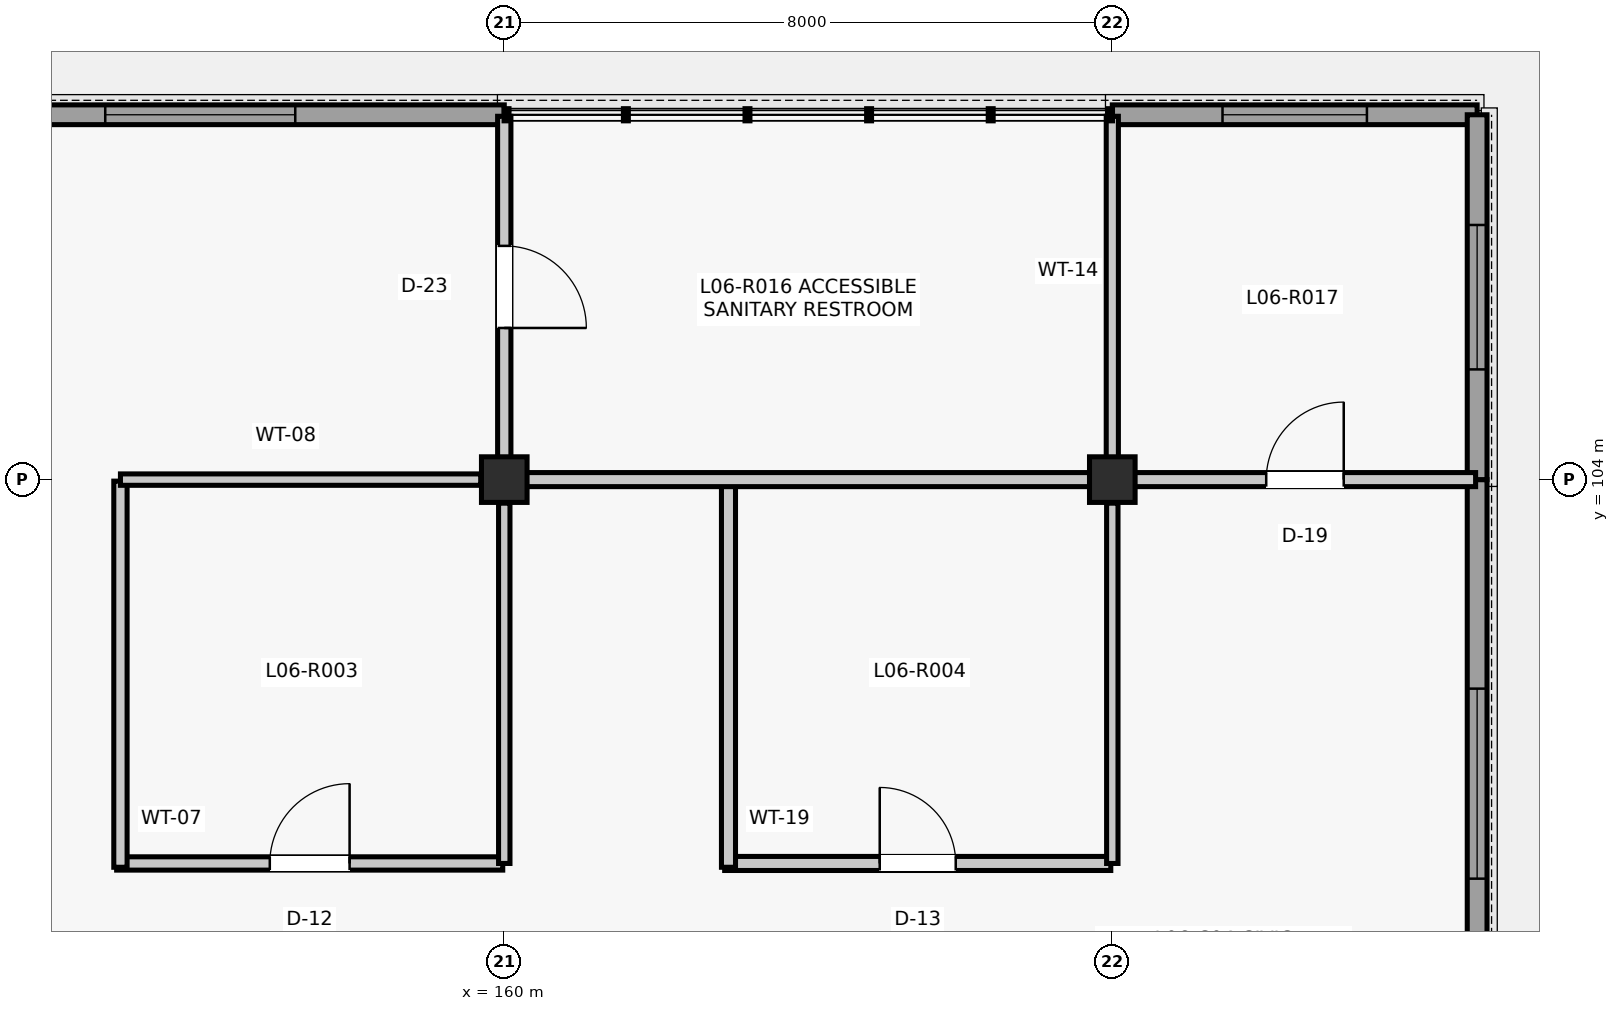
"""IFC4 building model, lengths in metres.
Left out: names, types, materials, properties, quantities, classifications, styles, units other than length and angle.
Written with IfcOpenShell. Run it as: python <this file> out.ifc"""

import sys

from ifc_helpers import new_model, si_unit, direction, frame, frame_2d, origin, origin_2d, place, context, subcontext, project, spatial, rectangle, extrude, element, fill, save


model = new_model("IFC4")
c1 = context("Model", 3, precision=1e-05, world=origin(), true_north=direction((0.0, 1.0)))
c2 = subcontext(c1, "Body", "Model", "MODEL_VIEW")
j1 = project(units=[si_unit("LENGTHUNIT", "METRE"), si_unit("PLANEANGLEUNIT", "RADIAN")], contexts=[c1])
p1 = place(None, origin())
s1 = spatial("IfcSite", under=j1, at=p1, CompositionType="ELEMENT")
p2 = place(p1, origin())
s2 = spatial("IfcBuilding", under=s1, at=p2, CompositionType="ELEMENT")
p3 = place(p2, frame((0.0, 0.0, 25.74)))
s3 = spatial("IfcBuildingStorey", under=s2, at=p3, CompositionType="ELEMENT", Elevation=25.74)
for number, where, z_axis, x_axis in (
    (1, (160.0, 104.0, 0.0), (0.0, 0.0, 1.0), (1.0, 0.0, 0.0)),
    (2, (168.0, 104.0, 0.0), (0.0, 0.0, 1.0), (1.0, 0.0, 0.0)),
):
    element("IfcColumn", number, at=place(p3, frame(where, z_axis=z_axis, x_axis=x_axis)), inside=s3, PredefinedType="COLUMN", context=c2, shape_type="SweptSolid", body=[
        extrude(rectangle(XDim=0.6, YDim=0.6, at=origin_2d()), origin(), (0.0, 0.0, 1.0), 4.29),
    ])
p4 = place(p3, frame((152.0, 108.8, 0.0), z_axis=(0.0, 0.0, 1.0), x_axis=(1.0, 0.0, 0.0)))
e3 = element("IfcWall", 3, at=p4, inside=s3, PredefinedType="SOLIDWALL", context=c2, shape_type="SweptSolid", body=[
    extrude(rectangle(XDim=8.0, YDim=0.26, at=frame_2d((4.0, 0.0))), origin(), (0.0, 0.0, 1.0), 4.09),
])
p5 = place(p4, frame((2.75, 0.0, 0.85)))
e4 = element("IfcOpeningElement", 4, at=p5, cuts=e3, PredefinedType="OPENING", context=c2, shape_type="SweptSolid", body=[
    extrude(rectangle(XDim=2.5, YDim=2.2, at=frame_2d((1.25, 1.1))), frame((0.0, 0.14, 0.0), z_axis=(0.0, -1.0, 0.0), x_axis=(1.0, 0.0, 0.0)), (0.0, 0.0, 1.0), 0.28),
])
p6 = place(p3, frame((168.0, 108.8, 0.0), z_axis=(0.0, 0.0, 1.0), x_axis=(1.0, 0.0, 0.0)))
e5 = element("IfcWall", 5, at=p6, inside=s3, PredefinedType="SOLIDWALL", context=c2, shape_type="SweptSolid", body=[
    extrude(rectangle(XDim=4.8, YDim=0.26, at=frame_2d((2.4, 0.0))), origin(), (0.0, 0.0, 1.0), 4.09),
])
p7 = place(p6, frame((1.45, 0.0, 0.85)))
e6 = element("IfcOpeningElement", 6, at=p7, cuts=e5, PredefinedType="OPENING", context=c2, shape_type="SweptSolid", body=[
    extrude(rectangle(XDim=1.9, YDim=2.2, at=frame_2d((0.95, 1.1))), frame((0.0, 0.14, 0.0), z_axis=(0.0, -1.0, 0.0), x_axis=(1.0, 0.0, 0.0)), (0.0, 0.0, 1.0), 0.28),
])
p8 = place(p3, frame((172.8, 96.0, 0.0), z_axis=(0.0, 0.0, 1.0), x_axis=(0.0, 1.0, 0.0)))
e7 = element("IfcWall", 7, at=p8, inside=s3, PredefinedType="SOLIDWALL", context=c2, shape_type="SweptSolid", body=[
    extrude(rectangle(XDim=8.0, YDim=0.26, at=frame_2d((4.0, 0.0))), origin(), (0.0, 0.0, 1.0), 4.09),
])
p9 = place(p8, frame((2.75, 0.0, 0.85)))
e8 = element("IfcOpeningElement", 8, at=p9, cuts=e7, PredefinedType="OPENING", context=c2, shape_type="SweptSolid", body=[
    extrude(rectangle(XDim=2.5, YDim=2.2, at=frame_2d((1.25, 1.1))), frame((0.0, 0.14, 0.0), z_axis=(0.0, -1.0, 0.0), x_axis=(1.0, 0.0, 0.0)), (0.0, 0.0, 1.0), 0.28),
])
p10 = place(p3, frame((172.8, 104.0, 0.0), z_axis=(0.0, 0.0, 1.0), x_axis=(0.0, 1.0, 0.0)))
e9 = element("IfcWall", 9, at=p10, inside=s3, PredefinedType="SOLIDWALL", context=c2, shape_type="SweptSolid", body=[
    extrude(rectangle(XDim=4.8, YDim=0.26, at=frame_2d((2.4, 0.0))), origin(), (0.0, 0.0, 1.0), 4.09),
])
p11 = place(p10, frame((1.45, 0.0, 0.85)))
e10 = element("IfcOpeningElement", 10, at=p11, cuts=e9, PredefinedType="OPENING", context=c2, shape_type="SweptSolid", body=[
    extrude(rectangle(XDim=1.9, YDim=2.2, at=frame_2d((0.95, 1.1))), frame((0.0, 0.14, 0.0), z_axis=(0.0, -1.0, 0.0), x_axis=(1.0, 0.0, 0.0)), (0.0, 0.0, 1.0), 0.28),
])
p12 = place(p3, frame((154.9, 98.95, 0.0), z_axis=(0.0, 0.0, 1.0), x_axis=(1.0, 0.0, 0.0)))
e11 = element("IfcWall", 11, at=p12, inside=s3, PredefinedType="PARTITIONING", context=c2, shape_type="SweptSolid", body=[
    extrude(rectangle(XDim=5.08, YDim=0.175, at=frame_2d((2.54, 0.0))), origin(), (0.0, 0.0, 1.0), 3.408),
])
p13 = place(p12, frame((2.015, 0.0, 0.0)))
e12 = element("IfcOpeningElement", 12, at=p13, cuts=e11, PredefinedType="OPENING", context=c2, shape_type="SweptSolid", body=[
    extrude(rectangle(XDim=1.05, YDim=2.15, at=frame_2d((0.525, 1.075))), frame((0.0, 0.097, 0.0), z_axis=(0.0, -1.0, 0.0), x_axis=(1.0, 0.0, 0.0)), (0.0, 0.0, 1.0), 0.195),
])
p14 = place(p3, frame((154.95, 98.9, 0.0), z_axis=(0.0, 0.0, 1.0), x_axis=(0.0, 1.0, 0.0)))
e13 = element("IfcWall", 13, at=p14, inside=s3, PredefinedType="PARTITIONING", context=c2, shape_type="SweptSolid", body=[
    extrude(rectangle(XDim=5.08, YDim=0.175, at=frame_2d((2.54, 0.0))), origin(), (0.0, 0.0, 1.0), 3.408),
])
for number, where, z_axis, x_axis in (
    (14, (154.95, 104.0, 0.0), (0.0, 0.0, 1.0), (1.0, 0.0, 0.0)),
    (15, (160.0, 98.95, 0.0), (0.0, 0.0, 1.0), (0.0, 1.0, 0.0)),
):
    element("IfcWall", number, at=place(p3, frame(where, z_axis=z_axis, x_axis=x_axis)), inside=s3, PredefinedType="PARTITIONING", context=c2, shape_type="SweptSolid", body=[
        extrude(rectangle(XDim=4.74, YDim=0.15, at=frame_2d((2.37, 0.0))), origin(), (0.0, 0.0, 1.0), 3.408),
    ])
p15 = place(p3, frame((162.9, 98.95, 0.0), z_axis=(0.0, 0.0, 1.0), x_axis=(1.0, 0.0, 0.0)))
e16 = element("IfcWall", 16, at=p15, inside=s3, PredefinedType="PARTITIONING", context=c2, shape_type="SweptSolid", body=[
    extrude(rectangle(XDim=5.08, YDim=0.185, at=frame_2d((2.54, 0.0))), origin(), (0.0, 0.0, 1.0), 3.408),
])
p16 = place(p15, frame((2.04, 0.0, 0.0)))
e17 = element("IfcOpeningElement", 17, at=p16, cuts=e16, PredefinedType="OPENING", context=c2, shape_type="SweptSolid", body=[
    extrude(rectangle(XDim=1.0, YDim=2.15, at=frame_2d((0.5, 1.075))), frame((0.0, 0.103, 0.0), z_axis=(0.0, -1.0, 0.0), x_axis=(1.0, 0.0, 0.0)), (0.0, 0.0, 1.0), 0.205),
])
p17 = place(p3, frame((162.95, 98.9, 0.0), z_axis=(0.0, 0.0, 1.0), x_axis=(0.0, 1.0, 0.0)))
e18 = element("IfcWall", 18, at=p17, inside=s3, PredefinedType="PARTITIONING", context=c2, shape_type="SweptSolid", body=[
    extrude(rectangle(XDim=5.08, YDim=0.185, at=frame_2d((2.54, 0.0))), origin(), (0.0, 0.0, 1.0), 3.408),
])
p18 = place(p3, frame((168.0, 98.95, 0.0), z_axis=(0.0, 0.0, 1.0), x_axis=(0.0, 1.0, 0.0)))
e19 = element("IfcWall", 19, at=p18, inside=s3, PredefinedType="PARTITIONING", context=c2, shape_type="SweptSolid", body=[
    extrude(rectangle(XDim=4.74, YDim=0.15, at=frame_2d((2.37, 0.0))), origin(), (0.0, 0.0, 1.0), 3.408),
])
p19 = place(p3, frame((160.0, 104.29, 0.0), z_axis=(0.0, 0.0, 1.0), x_axis=(0.0, 1.0, 0.0)))
e20 = element("IfcWall", 20, at=p19, inside=s3, PredefinedType="PARTITIONING", context=c2, shape_type="SweptSolid", body=[
    extrude(rectangle(XDim=4.49, YDim=0.175, at=frame_2d((2.245, 0.0))), origin(), (0.0, 0.0, 1.0), 3.408),
])
p20 = place(p19, frame((1.705, 0.0, 0.0)))
e21 = element("IfcOpeningElement", 21, at=p20, cuts=e20, PredefinedType="OPENING", context=c2, shape_type="SweptSolid", body=[
    extrude(rectangle(XDim=1.08, YDim=2.2, at=frame_2d((0.54, 1.1))), frame((0.0, 0.097, 0.0), z_axis=(0.0, -1.0, 0.0), x_axis=(1.0, 0.0, 0.0)), (0.0, 0.0, 1.0), 0.195),
])
p21 = place(p3, frame((160.29, 104.0, 0.0), z_axis=(0.0, 0.0, 1.0), x_axis=(1.0, 0.0, 0.0)))
e22 = element("IfcWall", 22, at=p21, inside=s3, PredefinedType="PARTITIONING", context=c2, shape_type="SweptSolid", body=[
    extrude(rectangle(XDim=7.42, YDim=0.185, at=frame_2d((3.71, 0.0))), origin(), (0.0, 0.0, 1.0), 3.408),
])
p22 = place(p3, frame((168.0, 104.29, 0.0), z_axis=(0.0, 0.0, 1.0), x_axis=(0.0, 1.0, 0.0)))
e23 = element("IfcWall", 23, at=p22, inside=s3, PredefinedType="PARTITIONING", context=c2, shape_type="SweptSolid", body=[
    extrude(rectangle(XDim=4.49, YDim=0.16, at=frame_2d((2.245, 0.0))), origin(), (0.0, 0.0, 1.0), 3.408),
])
p23 = place(p3, frame((168.29, 104.0, 0.0), z_axis=(0.0, 0.0, 1.0), x_axis=(1.0, 0.0, 0.0)))
e24 = element("IfcWall", 24, at=p23, inside=s3, PredefinedType="PARTITIONING", context=c2, shape_type="SweptSolid", body=[
    extrude(rectangle(XDim=4.49, YDim=0.185, at=frame_2d((2.245, 0.0))), origin(), (0.0, 0.0, 1.0), 3.408),
])
p24 = place(p23, frame((1.735, 0.0, 0.0)))
e25 = element("IfcOpeningElement", 25, at=p24, cuts=e24, PredefinedType="OPENING", context=c2, shape_type="SweptSolid", body=[
    extrude(rectangle(XDim=1.02, YDim=2.2, at=frame_2d((0.51, 1.1))), frame((0.0, 0.103, 0.0), z_axis=(0.0, -1.0, 0.0), x_axis=(1.0, 0.0, 0.0)), (0.0, 0.0, 1.0), 0.205),
])
p25 = place(p5, origin())
e26 = element("IfcWindow", 26, at=p25, inside=s3, PartitioningType="SINGLE_PANEL", PredefinedType="WINDOW", context=c2, shape_type="SweptSolid", body=[
    extrude(rectangle(XDim=2.5, YDim=2.2, at=frame_2d((1.25, 1.1))), frame((0.0, 0.03, 0.0), z_axis=(0.0, -1.0, 0.0), x_axis=(1.0, 0.0, 0.0)), (0.0, 0.0, 1.0), 0.06),
])
fill(e4, e26)
p26 = place(p7, origin())
e27 = element("IfcWindow", 27, at=p26, inside=s3, PartitioningType="SINGLE_PANEL", PredefinedType="WINDOW", context=c2, shape_type="SweptSolid", body=[
    extrude(rectangle(XDim=1.9, YDim=2.2, at=frame_2d((0.95, 1.1))), frame((0.0, 0.03, 0.0), z_axis=(0.0, -1.0, 0.0), x_axis=(1.0, 0.0, 0.0)), (0.0, 0.0, 1.0), 0.06),
])
fill(e6, e27)
p27 = place(p9, origin())
e28 = element("IfcWindow", 28, at=p27, inside=s3, PartitioningType="SINGLE_PANEL", PredefinedType="WINDOW", context=c2, shape_type="SweptSolid", body=[
    extrude(rectangle(XDim=2.5, YDim=2.2, at=frame_2d((1.25, 1.1))), frame((0.0, 0.03, 0.0), z_axis=(0.0, -1.0, 0.0), x_axis=(1.0, 0.0, 0.0)), (0.0, 0.0, 1.0), 0.06),
])
fill(e8, e28)
p28 = place(p11, origin())
e29 = element("IfcWindow", 29, at=p28, inside=s3, PartitioningType="SINGLE_PANEL", PredefinedType="WINDOW", context=c2, shape_type="SweptSolid", body=[
    extrude(rectangle(XDim=1.9, YDim=2.2, at=frame_2d((0.95, 1.1))), frame((0.0, 0.03, 0.0), z_axis=(0.0, -1.0, 0.0), x_axis=(1.0, 0.0, 0.0)), (0.0, 0.0, 1.0), 0.06),
])
fill(e10, e29)
p29 = place(p13, origin())
e30 = element("IfcDoor", 30, at=p29, inside=s3, OperationType="SINGLE_SWING_RIGHT", PredefinedType="DOOR", context=c2, shape_type="SweptSolid", body=[
    extrude(rectangle(XDim=1.05, YDim=2.15, at=frame_2d((0.525, 1.075))), frame((0.0, 0.025, 0.0), z_axis=(0.0, -1.0, 0.0), x_axis=(1.0, 0.0, 0.0)), (0.0, 0.0, 1.0), 0.05),
])
fill(e12, e30)
p30 = place(p16, origin())
e31 = element("IfcDoor", 31, at=p30, inside=s3, OperationType="SINGLE_SWING_LEFT", PredefinedType="DOOR", context=c2, shape_type="SweptSolid", body=[
    extrude(rectangle(XDim=1.0, YDim=2.15, at=frame_2d((0.5, 1.075))), frame((0.0, 0.025, 0.0), z_axis=(0.0, -1.0, 0.0), x_axis=(1.0, 0.0, 0.0)), (0.0, 0.0, 1.0), 0.05),
])
fill(e17, e31)
p31 = place(p20, frame((1.08, 0.0, 0.0), z_axis=(0.0, 0.0, 1.0), x_axis=(-1.0, 0.0, 0.0)))
e32 = element("IfcDoor", 32, at=p31, inside=s3, OperationType="SINGLE_SWING_LEFT", PredefinedType="DOOR", context=c2, shape_type="SweptSolid", body=[
    extrude(rectangle(XDim=1.08, YDim=2.2, at=frame_2d((0.54, 1.1))), frame((0.0, 0.025, 0.0), z_axis=(0.0, -1.0, 0.0), x_axis=(1.0, 0.0, 0.0)), (0.0, 0.0, 1.0), 0.05),
])
fill(e21, e32)
p32 = place(p24, origin())
e33 = element("IfcDoor", 33, at=p32, inside=s3, OperationType="SINGLE_SWING_RIGHT", PredefinedType="DOOR", context=c2, shape_type="SweptSolid", body=[
    extrude(rectangle(XDim=1.02, YDim=2.2, at=frame_2d((0.51, 1.1))), frame((0.0, 0.025, 0.0), z_axis=(0.0, -1.0, 0.0), x_axis=(1.0, 0.0, 0.0)), (0.0, 0.0, 1.0), 0.05),
])
fill(e25, e33)
save(model, sys.argv[1])
